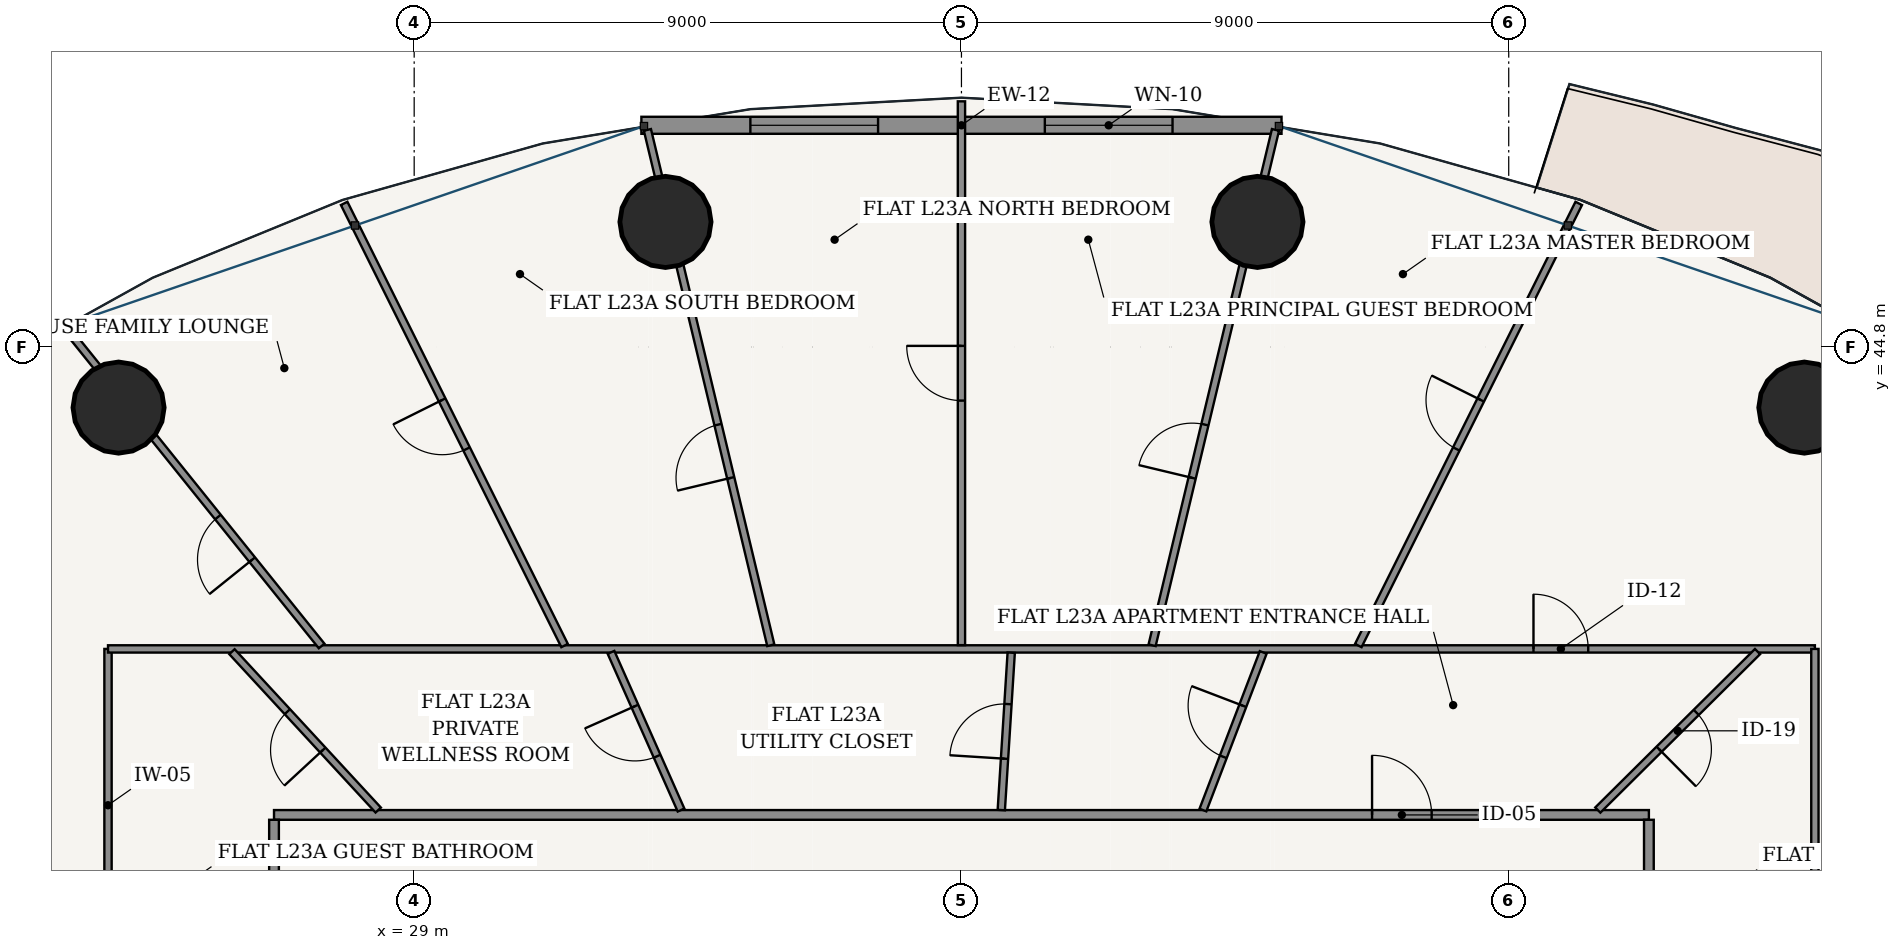
"""IFC4 building model, lengths in metres.
Left out: names, types, materials, properties, quantities, classifications, styles, units other than length and angle.
Written with IfcOpenShell. Run it as: python <this file> out.ifc"""

import sys

from ifc_helpers import new_model, si_unit, direction, frame, frame_2d, origin, origin_2d, place, context, subcontext, project, spatial, rectangle, hollow_circle, extrude, source, transform, mapped, element, fill, save


model = new_model("IFC4")
c1 = context("Model", 3, precision=1e-05, world=origin(), true_north=direction((-0.2419218956, 0.970295726276)))
c2 = subcontext(c1, "Body", "Model", "MODEL_VIEW")
j1 = project(units=[si_unit("LENGTHUNIT", "METRE"), si_unit("PLANEANGLEUNIT", "RADIAN")], contexts=[c1])
p1 = place(None, origin())
s1 = spatial("IfcSite", under=j1, at=p1, CompositionType="ELEMENT")
p2 = place(p1, origin())
s2 = spatial("IfcBuilding", under=s1, at=p2, CompositionType="ELEMENT")
p3 = place(p2, frame((0.0, 0.0, 90.6)))
s3 = spatial("IfcBuildingStorey", under=s2, at=p3, CompositionType="ELEMENT", Elevation=90.6)
for number, where, z_axis, x_axis in (
    (1, (51.862, 43.803, 0.0), (0.0, 0.0, 1.0), (1.0, 0.0, 0.0)),
    (2, (42.867, 46.857, 0.0), (0.0, 0.0, 1.0), (1.0, 0.0, 0.0)),
    (3, (33.133, 46.857, 0.0), (0.0, 0.0, 1.0), (1.0, 0.0, 0.0)),
    (4, (24.138, 43.803, 0.0), (0.0, 0.0, 1.0), (1.0, 0.0, 0.0)),
):
    element("IfcColumn", number, at=place(p3, frame(where, z_axis=z_axis, x_axis=x_axis)), inside=s3, PredefinedType="COLUMN", context=c2, shape_type="SweptSolid", body=[
        extrude(hollow_circle(Radius=0.75, WallThickness=0.045, at=origin_2d()), origin(), (0.0, 0.0, 1.0), 3.6),
    ])
p4 = place(p3, frame((43.264, 48.446, 0.0), z_axis=(0.0, 0.0, 1.0), x_axis=(-1.0, 0.0, 0.0)))
e5 = element("IfcWall", 5, at=p4, inside=s3, PredefinedType="SOLIDWALL", context=c2, shape_type="SweptSolid", body=[
    extrude(rectangle(XDim=10.527, YDim=0.28, at=frame_2d((5.264, 0.0))), origin(), (0.0, 0.0, 1.0), 3.325),
])
p5 = place(p4, frame((1.792, 0.0, 0.85)))
e6 = element("IfcOpeningElement", 6, at=p5, cuts=e5, PredefinedType="OPENING", context=c2, shape_type="SweptSolid", body=[
    extrude(rectangle(XDim=2.1, YDim=1.95, at=frame_2d((1.05, 0.975))), frame((0.0, 0.15, 0.0), z_axis=(0.0, -1.0, 0.0), x_axis=(1.0, 0.0, 0.0)), (0.0, 0.0, 1.0), 0.3),
])
p6 = place(p4, frame((6.635, 0.0, 0.85)))
e7 = element("IfcOpeningElement", 7, at=p6, cuts=e5, PredefinedType="OPENING", context=c2, shape_type="SweptSolid", body=[
    extrude(rectangle(XDim=2.1, YDim=1.95, at=frame_2d((1.05, 0.975))), frame((0.0, 0.15, 0.0), z_axis=(0.0, -1.0, 0.0), x_axis=(1.0, 0.0, 0.0)), (0.0, 0.0, 1.0), 0.3),
])
p7 = place(p3, frame((26.695, 37.105, 0.0), z_axis=(0.0, 0.0, 1.0), x_axis=(1.0, 0.0, 0.0)))
e8 = element("IfcWall", 8, at=p7, inside=s3, PredefinedType="PARTITIONING", context=c2, shape_type="SweptSolid", body=[
    extrude(rectangle(XDim=22.61, YDim=0.16, at=frame_2d((11.305, 0.0))), origin(), (0.0, 0.0, 1.0), 2.767),
])
p8 = place(p7, frame((18.058, 0.0, 0.0)))
e9 = element("IfcOpeningElement", 9, at=p8, cuts=e8, PredefinedType="OPENING", context=c2, shape_type="SweptSolid", body=[
    extrude(rectangle(XDim=0.98, YDim=2.2, at=frame_2d((0.49, 1.1))), frame((0.0, 0.09, 0.0), z_axis=(0.0, -1.0, 0.0), x_axis=(1.0, 0.0, 0.0)), (0.0, 0.0, 1.0), 0.18),
])
for number, where, z_axis, x_axis in (
    (10, (26.695, 16.575, 0.0), (0.0, 0.0, 1.0), (0.0, 1.0, 0.0)),
    (11, (49.305, 16.575, 0.0), (0.0, 0.0, 1.0), (0.0, 1.0, 0.0)),
):
    element("IfcWall", number, at=place(p3, frame(where, z_axis=z_axis, x_axis=x_axis)), inside=s3, PredefinedType="PARTITIONING", context=c2, shape_type="SweptSolid", body=[
        extrude(rectangle(XDim=20.45, YDim=0.16, at=frame_2d((10.225, 0.0))), origin(), (0.0, 0.0, 1.0), 2.767),
    ])
p9 = place(p3, frame((49.387, 33.121, 0.0), z_axis=(0.0, 0.0, 1.0), x_axis=(0.874320165728, 0.485349613992, 0.0)))
e12 = element("IfcWall", 12, at=p9, inside=s3, PredefinedType="PARTITIONING", context=c2, shape_type="SweptSolid", body=[
    extrude(rectangle(XDim=12.156, YDim=0.2, at=frame_2d((6.078, 0.0))), origin(), (0.0, 0.0, 1.0), 2.767),
])
p10 = place(p3, frame((23.965, 34.693, 0.0), z_axis=(0.0, 0.0, 1.0), x_axis=(0.0, 1.0, 0.0)))
e13 = element("IfcWall", 13, at=p10, inside=s3, PredefinedType="PARTITIONING", context=c2, shape_type="SweptSolid", body=[
    extrude(rectangle(XDim=5.142, YDim=0.12, at=frame_2d((2.571, 0.0))), origin(), (0.0, 0.0, 1.0), 3.004),
])
p11 = place(p3, frame((23.965, 39.835, 0.0), z_axis=(0.0, 0.0, 1.0), x_axis=(1.0, 0.0, 0.0)))
e14 = element("IfcWall", 14, at=p11, inside=s3, PredefinedType="PARTITIONING", context=c2, shape_type="SweptSolid", body=[
    extrude(rectangle(XDim=28.07, YDim=0.12, at=frame_2d((14.035, 0.0))), origin(), (0.0, 0.0, 1.0), 2.767),
])
p12 = place(p11, frame((23.442, 0.0, 0.0)))
e15 = element("IfcOpeningElement", 15, at=p12, cuts=e14, PredefinedType="OPENING", context=c2, shape_type="SweptSolid", body=[
    extrude(rectangle(XDim=0.9, YDim=2.15, at=frame_2d((0.45, 1.075))), frame((0.0, 0.07, 0.0), z_axis=(0.0, -1.0, 0.0), x_axis=(1.0, 0.0, 0.0)), (0.0, 0.0, 1.0), 0.14),
])
p13 = place(p3, frame((52.035, 39.835, 0.0), z_axis=(0.0, 0.0, 1.0), x_axis=(0.0, -1.0, 0.0)))
e16 = element("IfcWall", 16, at=p13, inside=s3, PredefinedType="PARTITIONING", context=c2, shape_type="SweptSolid", body=[
    extrude(rectangle(XDim=5.142, YDim=0.12, at=frame_2d((2.571, 0.0))), origin(), (0.0, 0.0, 1.0), 3.004),
])
p14 = place(p3, frame((44.526, 39.89, 0.0), z_axis=(0.0, 0.0, 1.0), x_axis=(0.446167584581, 0.894949432353, 0.0)))
e17 = element("IfcWall", 17, at=p14, inside=s3, PredefinedType="PARTITIONING", context=c2, shape_type="SweptSolid", body=[
    extrude(rectangle(XDim=8.125, YDim=0.12, at=frame_2d((4.062, 0.0))), origin(), (0.0, 0.0, 1.0), 2.767),
])
p15 = place(p14, frame((3.612, 0.0, 0.0)))
e18 = element("IfcOpeningElement", 18, at=p15, cuts=e17, PredefinedType="OPENING", context=c2, shape_type="SweptSolid", body=[
    extrude(rectangle(XDim=0.9, YDim=2.15, at=frame_2d((0.45, 1.075))), frame((0.0, 0.07, 0.0), z_axis=(0.0, -1.0, 0.0), x_axis=(1.0, 0.0, 0.0)), (0.0, 0.0, 1.0), 0.14),
])
p16 = place(p3, frame((41.135, 39.895, 0.0), z_axis=(0.0, 0.0, 1.0), x_axis=(0.23282725047, 0.97251810854, 0.0)))
e19 = element("IfcWall", 19, at=p16, inside=s3, PredefinedType="PARTITIONING", context=c2, shape_type="SweptSolid", body=[
    extrude(rectangle(XDim=8.715, YDim=0.12, at=frame_2d((4.357, 0.0))), origin(), (0.0, 0.0, 1.0), 2.767),
])
p17 = place(p16, frame((2.831, 0.0, 0.0)))
e20 = element("IfcOpeningElement", 20, at=p17, cuts=e19, PredefinedType="OPENING", context=c2, shape_type="SweptSolid", body=[
    extrude(rectangle(XDim=0.9, YDim=2.15, at=frame_2d((0.45, 1.075))), frame((0.0, 0.07, 0.0), z_axis=(0.0, -1.0, 0.0), x_axis=(1.0, 0.0, 0.0)), (0.0, 0.0, 1.0), 0.14),
])
p18 = place(p3, frame((38.0, 39.897, 0.0), z_axis=(0.0, 0.0, 1.0), x_axis=(0.0, 1.0, 0.0)))
e21 = element("IfcWall", 21, at=p18, inside=s3, PredefinedType="PARTITIONING", context=c2, shape_type="SweptSolid", body=[
    extrude(rectangle(XDim=8.943, YDim=0.12, at=frame_2d((4.472, 0.0))), origin(), (0.0, 0.0, 1.0), 2.767),
])
p19 = place(p18, frame((4.021, 0.0, 0.0)))
e22 = element("IfcOpeningElement", 22, at=p19, cuts=e21, PredefinedType="OPENING", context=c2, shape_type="SweptSolid", body=[
    extrude(rectangle(XDim=0.9, YDim=2.15, at=frame_2d((0.45, 1.075))), frame((0.0, 0.07, 0.0), z_axis=(0.0, -1.0, 0.0), x_axis=(1.0, 0.0, 0.0)), (0.0, 0.0, 1.0), 0.14),
])
p20 = place(p3, frame((34.865, 39.895, 0.0), z_axis=(0.0, 0.0, 1.0), x_axis=(-0.23282725047, 0.97251810854, 0.0)))
e23 = element("IfcWall", 23, at=p20, inside=s3, PredefinedType="PARTITIONING", context=c2, shape_type="SweptSolid", body=[
    extrude(rectangle(XDim=8.715, YDim=0.12, at=frame_2d((4.357, 0.0))), origin(), (0.0, 0.0, 1.0), 2.767),
])
p21 = place(p20, frame((2.83, 0.0, 0.0)))
e24 = element("IfcOpeningElement", 24, at=p21, cuts=e23, PredefinedType="OPENING", context=c2, shape_type="SweptSolid", body=[
    extrude(rectangle(XDim=0.9, YDim=2.15, at=frame_2d((0.45, 1.075))), frame((0.0, 0.07, 0.0), z_axis=(0.0, -1.0, 0.0), x_axis=(1.0, 0.0, 0.0)), (0.0, 0.0, 1.0), 0.14),
])
p22 = place(p3, frame((31.474, 39.89, 0.0), z_axis=(0.0, 0.0, 1.0), x_axis=(-0.446167584581, 0.894949432353, 0.0)))
e25 = element("IfcWall", 25, at=p22, inside=s3, PredefinedType="PARTITIONING", context=c2, shape_type="SweptSolid", body=[
    extrude(rectangle(XDim=8.125, YDim=0.12, at=frame_2d((4.062, 0.0))), origin(), (0.0, 0.0, 1.0), 2.767),
])
p23 = place(p22, frame((3.612, 0.0, 0.0)))
e26 = element("IfcOpeningElement", 26, at=p23, cuts=e25, PredefinedType="OPENING", context=c2, shape_type="SweptSolid", body=[
    extrude(rectangle(XDim=0.9, YDim=2.15, at=frame_2d((0.45, 1.075))), frame((0.0, 0.07, 0.0), z_axis=(0.0, -1.0, 0.0), x_axis=(1.0, 0.0, 0.0)), (0.0, 0.0, 1.0), 0.14),
])
p24 = place(p3, frame((27.478, 39.883, 0.0), z_axis=(0.0, 0.0, 1.0), x_axis=(-0.62672583251, 0.779239841682, 0.0)))
e27 = element("IfcWall", 27, at=p24, inside=s3, PredefinedType="PARTITIONING", context=c2, shape_type="SweptSolid", body=[
    extrude(rectangle(XDim=6.678, YDim=0.12, at=frame_2d((3.339, 0.0))), origin(), (0.0, 0.0, 1.0), 2.767),
])
p25 = place(p24, frame((1.821, 0.0, 0.0)))
e28 = element("IfcOpeningElement", 28, at=p25, cuts=e27, PredefinedType="OPENING", context=c2, shape_type="SweptSolid", body=[
    extrude(rectangle(XDim=0.9, YDim=2.15, at=frame_2d((0.45, 1.075))), frame((0.0, 0.07, 0.0), z_axis=(0.0, -1.0, 0.0), x_axis=(1.0, 0.0, 0.0)), (0.0, 0.0, 1.0), 0.14),
])
p26 = place(p3, frame((48.465, 37.185, 0.0), z_axis=(0.0, 0.0, 1.0), x_axis=(0.709839752998, 0.704363205359, 0.0)))
e29 = element("IfcWall", 29, at=p26, inside=s3, PredefinedType="PARTITIONING", context=c2, shape_type="SweptSolid", body=[
    extrude(rectangle(XDim=3.7, YDim=0.12, at=frame_2d((1.85, 0.0))), origin(), (0.0, 0.0, 1.0), 2.767),
])
p27 = place(p26, frame((1.42, 0.0, 0.0)))
e30 = element("IfcOpeningElement", 30, at=p27, cuts=e29, PredefinedType="OPENING", context=c2, shape_type="SweptSolid", body=[
    extrude(rectangle(XDim=0.86, YDim=2.15, at=frame_2d((0.43, 1.075))), frame((0.0, 0.07, 0.0), z_axis=(0.0, -1.0, 0.0), x_axis=(1.0, 0.0, 0.0)), (0.0, 0.0, 1.0), 0.14),
])
p28 = place(p3, frame((41.971, 37.185, 0.0), z_axis=(0.0, 0.0, 1.0), x_axis=(0.357180358075, 0.934035433913, 0.0)))
e31 = element("IfcWall", 31, at=p28, inside=s3, PredefinedType="PARTITIONING", context=c2, shape_type="SweptSolid", body=[
    extrude(rectangle(XDim=2.775, YDim=0.12, at=frame_2d((1.388, 0.0))), origin(), (0.0, 0.0, 1.0), 3.325),
])
p29 = place(p28, frame((0.938, 0.0, 0.0)))
e32 = element("IfcOpeningElement", 32, at=p29, cuts=e31, PredefinedType="OPENING", context=c2, shape_type="SweptSolid", body=[
    extrude(rectangle(XDim=0.9, YDim=2.15, at=frame_2d((0.45, 1.075))), frame((0.0, 0.07, 0.0), z_axis=(0.0, -1.0, 0.0), x_axis=(1.0, 0.0, 0.0)), (0.0, 0.0, 1.0), 0.14),
])
p30 = place(p3, frame((38.655, 37.185, 0.0), z_axis=(0.0, 0.0, 1.0), x_axis=(0.062981965009, 0.998014665265, 0.0)))
e33 = element("IfcWall", 33, at=p30, inside=s3, PredefinedType="PARTITIONING", context=c2, shape_type="SweptSolid", body=[
    extrude(rectangle(XDim=2.593, YDim=0.12, at=frame_2d((1.297, 0.0))), origin(), (0.0, 0.0, 1.0), 3.325),
])
p31 = place(p30, frame((0.847, 0.0, 0.0)))
e34 = element("IfcOpeningElement", 34, at=p31, cuts=e33, PredefinedType="OPENING", context=c2, shape_type="SweptSolid", body=[
    extrude(rectangle(XDim=0.9, YDim=2.15, at=frame_2d((0.45, 1.075))), frame((0.0, 0.07, 0.0), z_axis=(0.0, -1.0, 0.0), x_axis=(1.0, 0.0, 0.0)), (0.0, 0.0, 1.0), 0.14),
])
p32 = place(p3, frame((33.389, 37.185, 0.0), z_axis=(0.0, 0.0, 1.0), x_axis=(-0.40585903307, 0.913935689902, 0.0)))
e35 = element("IfcWall", 35, at=p32, inside=s3, PredefinedType="PARTITIONING", context=c2, shape_type="SweptSolid", body=[
    extrude(rectangle(XDim=2.837, YDim=0.12, at=frame_2d((1.419, 0.0))), origin(), (0.0, 0.0, 1.0), 3.325),
])
p33 = place(p32, frame((0.969, 0.0, 0.0)))
e36 = element("IfcOpeningElement", 36, at=p33, cuts=e35, PredefinedType="OPENING", context=c2, shape_type="SweptSolid", body=[
    extrude(rectangle(XDim=0.9, YDim=2.15, at=frame_2d((0.45, 1.075))), frame((0.0, 0.07, 0.0), z_axis=(0.0, -1.0, 0.0), x_axis=(1.0, 0.0, 0.0)), (0.0, 0.0, 1.0), 0.14),
])
p34 = place(p3, frame((28.409, 37.185, 0.0), z_axis=(0.0, 0.0, 1.0), x_axis=(-0.678451695105, 0.734645014554, 0.0)))
e37 = element("IfcWall", 37, at=p34, inside=s3, PredefinedType="PARTITIONING", context=c2, shape_type="SweptSolid", body=[
    extrude(rectangle(XDim=3.545, YDim=0.12, at=frame_2d((1.772, 0.0))), origin(), (0.0, 0.0, 1.0), 2.767),
])
p35 = place(p34, frame((1.343, 0.0, 0.0)))
e38 = element("IfcOpeningElement", 38, at=p35, cuts=e37, PredefinedType="OPENING", context=c2, shape_type="SweptSolid", body=[
    extrude(rectangle(XDim=0.86, YDim=2.15, at=frame_2d((0.43, 1.075))), frame((0.0, 0.07, 0.0), z_axis=(0.0, -1.0, 0.0), x_axis=(1.0, 0.0, 0.0)), (0.0, 0.0, 1.0), 0.14),
])
p36 = place(p3, frame((26.615, 33.12, 0.0), z_axis=(0.0, 0.0, 1.0), x_axis=(-0.874319192772, 0.485351366692, 0.0)))
e39 = element("IfcWall", 39, at=p36, inside=s3, PredefinedType="PARTITIONING", context=c2, shape_type="SweptSolid", body=[
    extrude(rectangle(XDim=12.158, YDim=0.2, at=frame_2d((6.079, 0.0))), origin(), (0.0, 0.0, 1.0), 2.767),
])
m1 = source(origin(), c2, "Body", "SweptSolid", [
    extrude(rectangle(XDim=2.1, YDim=1.95, at=frame_2d((1.05, 0.975))), frame((0.0, 0.03, 0.0), z_axis=(0.0, -1.0, 0.0), x_axis=(1.0, 0.0, 0.0)), (0.0, 0.0, 1.0), 0.06),
])
p37 = place(p5, origin())
e40 = element("IfcWindow", 40, at=p37, inside=s3, PartitioningType="SINGLE_PANEL", PredefinedType="WINDOW", context=c2, shape_type="MappedRepresentation", body=[
    mapped(m1, transform((0.0, 0.0, 0.0), scale=1.0)),
])
fill(e6, e40)
p38 = place(p6, origin())
e41 = element("IfcWindow", 41, at=p38, inside=s3, PartitioningType="SINGLE_PANEL", PredefinedType="WINDOW", context=c2, shape_type="MappedRepresentation", body=[
    mapped(m1, transform((0.0, 0.0, 0.0), scale=1.0)),
])
fill(e7, e41)
m2 = source(origin(), c2, "Body", "SweptSolid", [
    extrude(rectangle(XDim=0.98, YDim=2.2, at=frame_2d((0.49, 1.1))), frame((0.0, 0.025, 0.0), z_axis=(0.0, -1.0, 0.0), x_axis=(1.0, 0.0, 0.0)), (0.0, 0.0, 1.0), 0.05),
])
p39 = place(p8, origin())
e42 = element("IfcDoor", 42, at=p39, inside=s3, OperationType="SINGLE_SWING_LEFT", PredefinedType="DOOR", context=c2, shape_type="MappedRepresentation", body=[
    mapped(m2, transform((0.0, 0.0, 0.0), scale=1.0)),
])
fill(e9, e42)
m3 = source(origin(), c2, "Body", "SweptSolid", [
    extrude(rectangle(XDim=0.86, YDim=2.15, at=frame_2d((0.43, 1.075))), frame((0.0, 0.025, 0.0), z_axis=(0.0, -1.0, 0.0), x_axis=(1.0, 0.0, 0.0)), (0.0, 0.0, 1.0), 0.05),
])
p40 = place(p27, frame((0.86, 0.0, 0.0), z_axis=(0.0, 0.0, 1.0), x_axis=(-1.0, 0.0, 0.0)))
e43 = element("IfcDoor", 43, at=p40, inside=s3, OperationType="SINGLE_SWING_RIGHT", PredefinedType="DOOR", context=c2, shape_type="MappedRepresentation", body=[
    mapped(m3, transform((0.0, 0.0, 0.0), scale=1.0)),
])
fill(e30, e43)
m4 = source(origin(), c2, "Body", "SweptSolid", [
    extrude(rectangle(XDim=0.9, YDim=2.15, at=frame_2d((0.45, 1.075))), frame((0.0, 0.025, 0.0), z_axis=(0.0, -1.0, 0.0), x_axis=(1.0, 0.0, 0.0)), (0.0, 0.0, 1.0), 0.05),
])
p41 = place(p12, origin())
e44 = element("IfcDoor", 44, at=p41, inside=s3, OperationType="SINGLE_SWING_LEFT", PredefinedType="DOOR", context=c2, shape_type="MappedRepresentation", body=[
    mapped(m4, transform((0.0, 0.0, 0.0), scale=1.0)),
])
fill(e15, e44)
p42 = place(p29, origin())
e45 = element("IfcDoor", 45, at=p42, inside=s3, OperationType="SINGLE_SWING_RIGHT", PredefinedType="DOOR", context=c2, shape_type="MappedRepresentation", body=[
    mapped(m4, transform((0.0, 0.0, 0.0), scale=1.0)),
])
fill(e32, e45)
p43 = place(p31, origin())
e46 = element("IfcDoor", 46, at=p43, inside=s3, OperationType="SINGLE_SWING_LEFT", PredefinedType="DOOR", context=c2, shape_type="MappedRepresentation", body=[
    mapped(m4, transform((0.0, 0.0, 0.0), scale=1.0)),
])
fill(e34, e46)
p44 = place(p33, origin())
e47 = element("IfcDoor", 47, at=p44, inside=s3, OperationType="SINGLE_SWING_RIGHT", PredefinedType="DOOR", context=c2, shape_type="MappedRepresentation", body=[
    mapped(m4, transform((0.0, 0.0, 0.0), scale=1.0)),
])
fill(e36, e47)
p45 = place(p35, origin())
e48 = element("IfcDoor", 48, at=p45, inside=s3, OperationType="SINGLE_SWING_LEFT", PredefinedType="DOOR", context=c2, shape_type="MappedRepresentation", body=[
    mapped(m3, transform((0.0, 0.0, 0.0), scale=1.0)),
])
fill(e38, e48)
p46 = place(p15, origin())
e49 = element("IfcDoor", 49, at=p46, inside=s3, OperationType="SINGLE_SWING_RIGHT", PredefinedType="DOOR", context=c2, shape_type="MappedRepresentation", body=[
    mapped(m4, transform((0.0, 0.0, 0.0), scale=1.0)),
])
fill(e18, e49)
p47 = place(p17, origin())
e50 = element("IfcDoor", 50, at=p47, inside=s3, OperationType="SINGLE_SWING_LEFT", PredefinedType="DOOR", context=c2, shape_type="MappedRepresentation", body=[
    mapped(m4, transform((0.0, 0.0, 0.0), scale=1.0)),
])
fill(e20, e50)
p48 = place(p19, origin())
e51 = element("IfcDoor", 51, at=p48, inside=s3, OperationType="SINGLE_SWING_RIGHT", PredefinedType="DOOR", context=c2, shape_type="MappedRepresentation", body=[
    mapped(m4, transform((0.0, 0.0, 0.0), scale=1.0)),
])
fill(e22, e51)
p49 = place(p21, origin())
e52 = element("IfcDoor", 52, at=p49, inside=s3, OperationType="SINGLE_SWING_LEFT", PredefinedType="DOOR", context=c2, shape_type="MappedRepresentation", body=[
    mapped(m4, transform((0.0, 0.0, 0.0), scale=1.0)),
])
fill(e24, e52)
p50 = place(p23, origin())
e53 = element("IfcDoor", 53, at=p50, inside=s3, OperationType="SINGLE_SWING_RIGHT", PredefinedType="DOOR", context=c2, shape_type="MappedRepresentation", body=[
    mapped(m4, transform((0.0, 0.0, 0.0), scale=1.0)),
])
fill(e26, e53)
p51 = place(p25, origin())
e54 = element("IfcDoor", 54, at=p51, inside=s3, OperationType="SINGLE_SWING_LEFT", PredefinedType="DOOR", context=c2, shape_type="MappedRepresentation", body=[
    mapped(m4, transform((0.0, 0.0, 0.0), scale=1.0)),
])
fill(e28, e54)
save(model, sys.argv[1])
